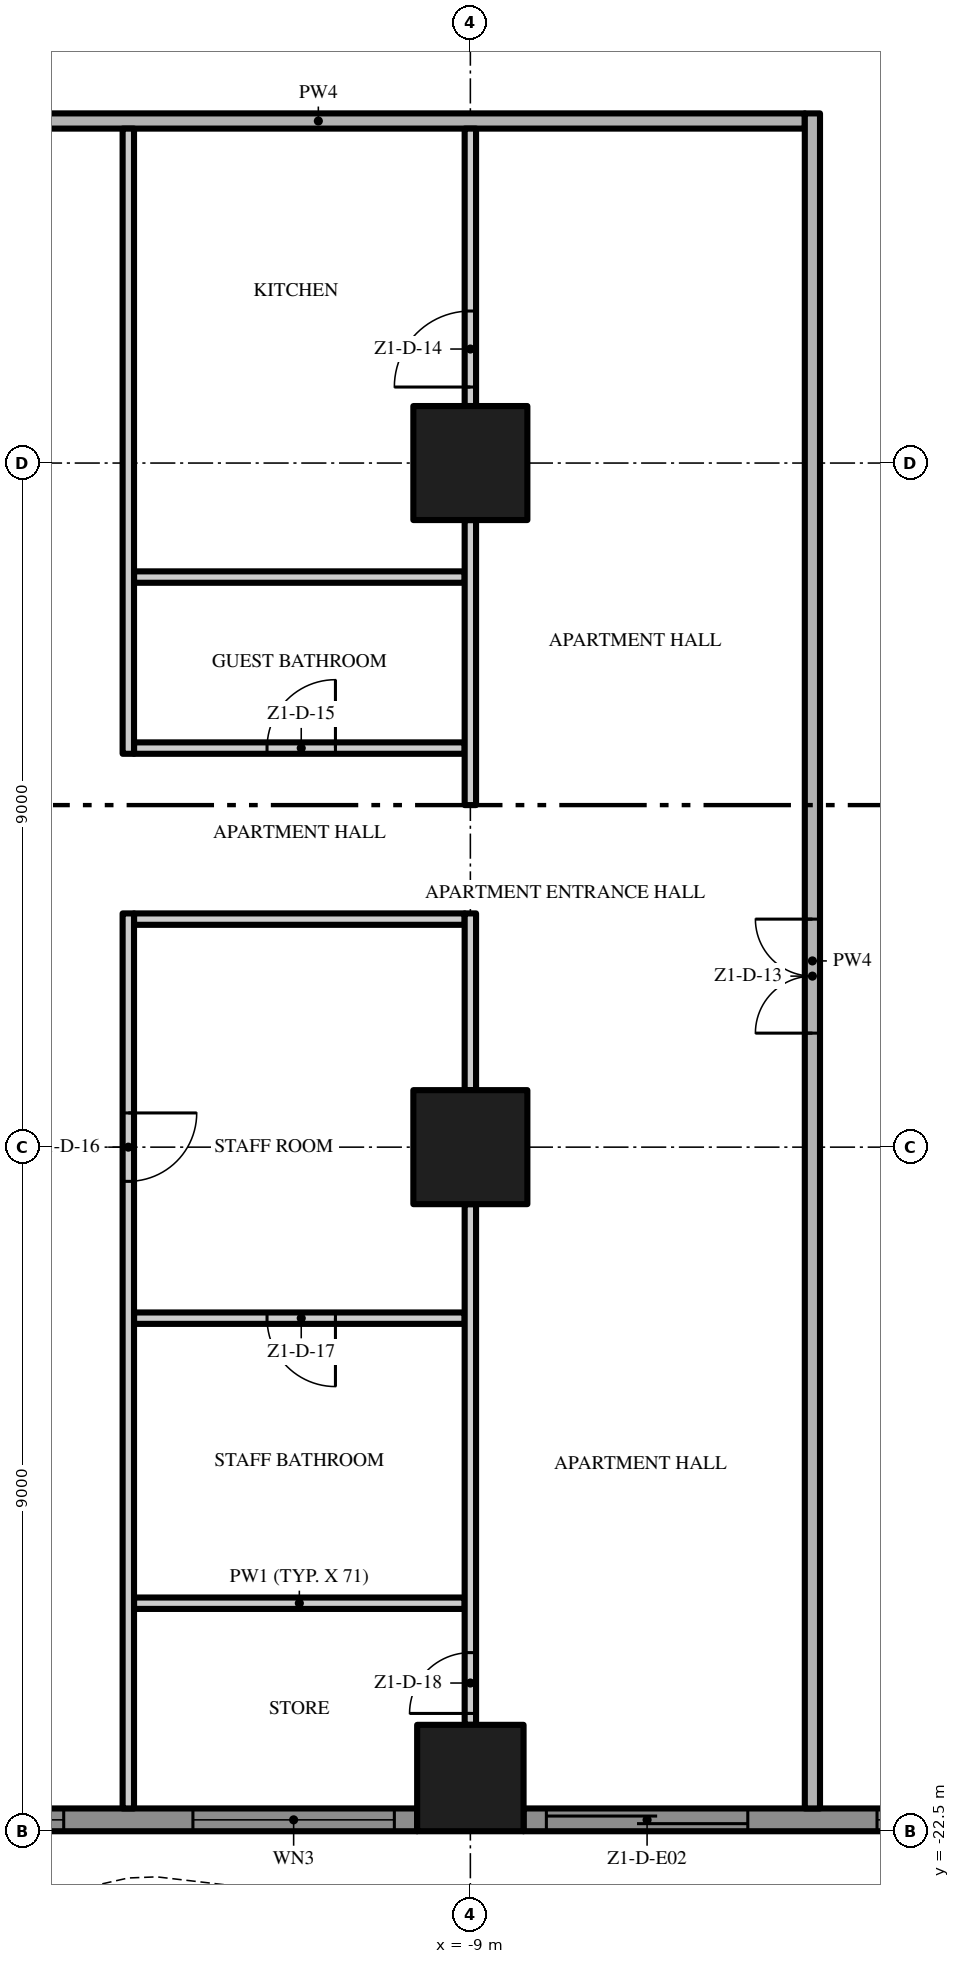
"""IFC4 building model, lengths in metres.
Left out: names, types, materials, properties, quantities, classifications, styles, units other than length and angle.
Written with IfcOpenShell. Run it as: python <this file> out.ifc"""

import sys

from ifc_helpers import new_model, si_unit, direction, frame, frame_2d, origin, origin_2d, place, context, subcontext, project, spatial, polyline, rectangle, outline, extrude, element, fill, save


model = new_model("IFC4")
c1 = context("Model", 3, precision=1e-05, world=origin(), true_north=direction((0.0, 1.0)))
c2 = subcontext(c1, "Body", "Model", "MODEL_VIEW")
j1 = project(units=[si_unit("LENGTHUNIT", "METRE"), si_unit("PLANEANGLEUNIT", "RADIAN")], contexts=[c1])
p1 = place(None, origin())
s1 = spatial("IfcSite", under=j1, at=p1, CompositionType="ELEMENT")
p2 = place(p1, origin())
s2 = spatial("IfcBuilding", under=s1, at=p2, CompositionType="ELEMENT")
p3 = place(p2, frame((0.0, 0.0, 49.2)))
s3 = spatial("IfcBuildingStorey", under=s2, at=p3, CompositionType="ELEMENT", Elevation=49.2)
p4 = place(p3, frame((-9.0, -13.5, 0.0), z_axis=(0.0, 0.0, 1.0), x_axis=(1.0, 0.0, 0.0)))
e1 = element("IfcColumn", 1, at=p4, inside=s3, PredefinedType="COLUMN", context=c2, shape_type="SweptSolid", body=[
    extrude(rectangle(XDim=1.5, YDim=1.5, at=origin_2d()), origin(), (0.0, 0.0, 1.0), 3.5),
])
p5 = place(p3, frame((-9.0, -21.8, 0.0), z_axis=(0.0, 0.0, 1.0), x_axis=(1.0, 0.0, 0.0)))
e2 = element("IfcColumn", 2, at=p5, inside=s3, PredefinedType="COLUMN", context=c2, shape_type="SweptSolid", body=[
    extrude(rectangle(XDim=1.4, YDim=1.4, at=origin_2d()), origin(), (0.0, 0.0, 1.0), 3.5),
])
p6 = place(p3, frame((-9.0, -4.5, 0.0), z_axis=(0.0, 0.0, 1.0), x_axis=(1.0, 0.0, 0.0)))
e3 = element("IfcColumn", 3, at=p6, inside=s3, PredefinedType="COLUMN", context=c2, shape_type="SweptSolid", body=[
    extrude(rectangle(XDim=1.5, YDim=1.5, at=origin_2d()), origin(), (0.0, 0.0, 1.0), 3.5),
])
p7 = place(p3, frame((-9.7, -22.35, 0.0), z_axis=(0.0, 0.0, 1.0), x_axis=(-1.0, 0.0, 0.0)))
e4 = element("IfcWall", 4, at=p7, inside=s3, PredefinedType="SOLIDWALL", context=c2, shape_type="SweptSolid", body=[
    extrude(rectangle(XDim=7.6, YDim=0.3, at=frame_2d((3.8, 0.0))), origin(), (0.0, 0.0, 1.0), 3.5),
])
p8 = place(p7, frame((4.65, 0.0, 0.45)))
e5 = element("IfcOpeningElement", 5, at=p8, cuts=e4, PredefinedType="OPENING", context=c2, shape_type="SweptSolid", body=[
    extrude(rectangle(XDim=2.65, YDim=2.65, at=frame_2d((1.325, 1.325))), frame((0.0, 0.16, 0.0), z_axis=(0.0, -1.0, 0.0), x_axis=(1.0, 0.0, 0.0)), (0.0, 0.0, 1.0), 0.32),
])
p9 = place(p7, frame((0.3, 0.0, 0.45)))
e6 = element("IfcOpeningElement", 6, at=p9, cuts=e4, PredefinedType="OPENING", context=c2, shape_type="SweptSolid", body=[
    extrude(rectangle(XDim=2.65, YDim=2.65, at=frame_2d((1.325, 1.325))), frame((0.0, 0.16, 0.0), z_axis=(0.0, -1.0, 0.0), x_axis=(1.0, 0.0, 0.0)), (0.0, 0.0, 1.0), 0.32),
])
p10 = place(p3, frame((-0.7, -22.35, 0.0), z_axis=(0.0, 0.0, 1.0), x_axis=(-1.0, 0.0, 0.0)))
e7 = element("IfcWall", 7, at=p10, inside=s3, PredefinedType="SOLIDWALL", context=c2, shape_type="SweptSolid", body=[
    extrude(rectangle(XDim=7.6, YDim=0.3, at=frame_2d((3.8, 0.0))), origin(), (0.0, 0.0, 1.0), 3.5),
])
p11 = place(p10, frame((4.65, 0.0, 0.0)))
e8 = element("IfcOpeningElement", 8, at=p11, cuts=e7, PredefinedType="OPENING", context=c2, shape_type="SweptSolid", body=[
    extrude(rectangle(XDim=2.65, YDim=2.4, at=frame_2d((1.325, 1.2))), frame((0.0, 0.16, 0.0), z_axis=(0.0, -1.0, 0.0), x_axis=(1.0, 0.0, 0.0)), (0.0, 0.0, 1.0), 0.32),
])
p12 = place(p10, frame((0.3, 0.0, 0.45)))
e9 = element("IfcOpeningElement", 9, at=p12, cuts=e7, PredefinedType="OPENING", context=c2, shape_type="SweptSolid", body=[
    extrude(rectangle(XDim=2.65, YDim=2.65, at=frame_2d((1.325, 1.325))), frame((0.0, 0.16, 0.0), z_axis=(0.0, -1.0, 0.0), x_axis=(1.0, 0.0, 0.0)), (0.0, 0.0, 1.0), 0.32),
])
p13 = place(p3, origin())
e10 = element("IfcWall", 10, at=p13, inside=s3, PredefinedType="USERDEFINED", context=c2, shape_type="SweptSolid", body=[
    extrude(outline(polyline([(-22.5, -25.149), (-21.0, -25.485), (-20.625, -25.5), (-19.5, -25.369), (-18.0, -24.845), (-16.5, -24.112), (-15.0, -23.451), (-13.5, -23.115), (-13.125, -23.1), (-12.0, -23.231), (-10.5, -23.755), (-9.0, -24.488), (-7.5, -25.149), (-6.0, -25.485), (-5.625, -25.5), (-4.5, -25.369), (-3.0, -24.845), (-1.5, -24.112), (0.0, -23.451), (1.5, -23.115), (1.875, -23.1), (3.0, -23.231), (4.5, -23.755), (6.0, -24.488), (7.5, -25.149), (9.0, -25.485), (9.375, -25.5), (10.5, -25.369), (12.0, -24.845), (13.5, -24.112), (15.0, -23.451), (16.5, -23.115), (16.875, -23.1), (18.0, -23.231), (19.5, -23.755), (21.0, -24.488), (22.5, -25.149), (22.601, -24.92), (21.105, -24.261), (19.596, -23.524), (18.056, -22.986), (16.885, -22.849), (16.467, -22.866), (14.921, -23.213), (13.395, -23.885), (11.904, -24.614), (10.444, -25.124), (9.365, -25.249), (9.033, -25.236), (7.579, -24.91), (6.105, -24.261), (4.596, -23.524), (3.056, -22.986), (1.885, -22.849), (1.467, -22.866), (-0.079, -23.213), (-1.605, -23.885), (-3.096, -24.614), (-4.556, -25.124), (-5.635, -25.249), (-5.967, -25.236), (-7.421, -24.91), (-8.895, -24.261), (-10.404, -23.524), (-11.944, -22.986), (-13.115, -22.849), (-13.533, -22.866), (-15.079, -23.213), (-16.605, -23.885), (-18.096, -24.614), (-19.556, -25.124), (-20.635, -25.249), (-20.967, -25.236), (-22.445, -24.905), (-22.5, -25.149)])), origin(), (0.0, 0.0, 1.0), 0.9),
])
p14 = place(p3, frame((-13.425, -19.5, 0.0), z_axis=(0.0, 0.0, 1.0), x_axis=(1.0, 0.0, 0.0)))
e11 = element("IfcWall", 11, at=p14, inside=s3, PredefinedType="PARTITIONING", context=c2, shape_type="SweptSolid", body=[
    extrude(rectangle(XDim=4.35, YDim=0.15, at=frame_2d((2.175, 0.0))), origin(), (0.0, 0.0, 1.0), 3.5),
])
p15 = place(p3, frame((-9.075, -15.75, 0.0), z_axis=(0.0, 0.0, 1.0), x_axis=(-1.0, 0.0, 0.0)))
e12 = element("IfcWall", 12, at=p15, inside=s3, PredefinedType="PARTITIONING", context=c2, shape_type="SweptSolid", body=[
    extrude(rectangle(XDim=4.35, YDim=0.15, at=frame_2d((2.175, 0.0))), origin(), (0.0, 0.0, 1.0), 3.5),
])
p16 = place(p15, frame((1.7, 0.0, 0.0)))
e13 = element("IfcOpeningElement", 13, at=p16, cuts=e12, PredefinedType="OPENING", context=c2, shape_type="SweptSolid", body=[
    extrude(rectangle(XDim=0.9, YDim=2.1, at=frame_2d((0.45, 1.05))), frame((0.0, 0.085, 0.0), z_axis=(0.0, -1.0, 0.0), x_axis=(1.0, 0.0, 0.0)), (0.0, 0.0, 1.0), 0.17),
])
p17 = place(p3, frame((-13.425, -10.5, 0.0), z_axis=(0.0, 0.0, 1.0), x_axis=(1.0, 0.0, 0.0)))
e14 = element("IfcWall", 14, at=p17, inside=s3, PredefinedType="PARTITIONING", context=c2, shape_type="SweptSolid", body=[
    extrude(rectangle(XDim=4.35, YDim=0.15, at=frame_2d((2.175, 0.0))), origin(), (0.0, 0.0, 1.0), 3.5),
])
p18 = place(p3, frame((-13.425, -8.25, 0.0), z_axis=(0.0, 0.0, 1.0), x_axis=(1.0, 0.0, 0.0)))
e15 = element("IfcWall", 15, at=p18, inside=s3, PredefinedType="PARTITIONING", context=c2, shape_type="SweptSolid", body=[
    extrude(rectangle(XDim=4.35, YDim=0.15, at=frame_2d((2.175, 0.0))), origin(), (0.0, 0.0, 1.0), 3.5),
])
p19 = place(p18, frame((1.75, 0.0, 0.0)))
e16 = element("IfcOpeningElement", 16, at=p19, cuts=e15, PredefinedType="OPENING", context=c2, shape_type="SweptSolid", body=[
    extrude(rectangle(XDim=0.9, YDim=2.1, at=frame_2d((0.45, 1.05))), frame((0.0, 0.085, 0.0), z_axis=(0.0, -1.0, 0.0), x_axis=(1.0, 0.0, 0.0)), (0.0, 0.0, 1.0), 0.17),
])
p20 = place(p3, frame((-13.425, -6.0, 0.0), z_axis=(0.0, 0.0, 1.0), x_axis=(1.0, 0.0, 0.0)))
e17 = element("IfcWall", 17, at=p20, inside=s3, PredefinedType="PARTITIONING", context=c2, shape_type="SweptSolid", body=[
    extrude(rectangle(XDim=4.35, YDim=0.15, at=frame_2d((2.175, 0.0))), origin(), (0.0, 0.0, 1.0), 3.5),
])
p21 = place(p3, frame((-17.4, 0.0, 0.0), z_axis=(0.0, 0.0, 1.0), x_axis=(1.0, 0.0, 0.0)))
e18 = element("IfcWall", 18, at=p21, inside=s3, PredefinedType="PARTITIONING", context=c2, shape_type="SweptSolid", body=[
    extrude(rectangle(XDim=12.8, YDim=0.2, at=frame_2d((6.4, 0.0))), origin(), (0.0, 0.0, 1.0), 3.5),
])
p22 = place(p3, frame((-13.5, -10.425, 0.0), z_axis=(0.0, 0.0, 1.0), x_axis=(0.0, -1.0, 0.0)))
e19 = element("IfcWall", 19, at=p22, inside=s3, PredefinedType="PARTITIONING", context=c2, shape_type="SweptSolid", body=[
    extrude(rectangle(XDim=11.775, YDim=0.15, at=frame_2d((5.888, 0.0))), origin(), (0.0, 0.0, 1.0), 3.5),
])
p23 = place(p22, frame((2.625, 0.0, 0.0)))
e20 = element("IfcOpeningElement", 20, at=p23, cuts=e19, PredefinedType="OPENING", context=c2, shape_type="SweptSolid", body=[
    extrude(rectangle(XDim=0.9, YDim=2.1, at=frame_2d((0.45, 1.05))), frame((0.0, 0.085, 0.0), z_axis=(0.0, -1.0, 0.0), x_axis=(1.0, 0.0, 0.0)), (0.0, 0.0, 1.0), 0.17),
])
p24 = place(p3, frame((-13.5, -8.325, 0.0), z_axis=(0.0, 0.0, 1.0), x_axis=(0.0, 1.0, 0.0)))
e21 = element("IfcWall", 21, at=p24, inside=s3, PredefinedType="PARTITIONING", context=c2, shape_type="SweptSolid", body=[
    extrude(rectangle(XDim=8.225, YDim=0.15, at=frame_2d((4.112, 0.0))), origin(), (0.0, 0.0, 1.0), 3.5),
])
p25 = place(p3, frame((-9.0, -21.1, 0.0), z_axis=(0.0, 0.0, 1.0), x_axis=(0.0, 1.0, 0.0)))
e22 = element("IfcWall", 22, at=p25, inside=s3, PredefinedType="PARTITIONING", context=c2, shape_type="SweptSolid", body=[
    extrude(rectangle(XDim=6.85, YDim=0.15, at=frame_2d((3.425, 0.0))), origin(), (0.0, 0.0, 1.0), 3.5),
])
p26 = place(p25, frame((0.15, 0.0, 0.0)))
e23 = element("IfcOpeningElement", 23, at=p26, cuts=e22, PredefinedType="OPENING", context=c2, shape_type="SweptSolid", body=[
    extrude(rectangle(XDim=0.8, YDim=2.0, at=frame_2d((0.4, 1.0))), frame((0.0, 0.085, 0.0), z_axis=(0.0, -1.0, 0.0), x_axis=(1.0, 0.0, 0.0)), (0.0, 0.0, 1.0), 0.17),
])
p27 = place(p3, frame((-9.0, -12.75, 0.0), z_axis=(0.0, 0.0, 1.0), x_axis=(0.0, 1.0, 0.0)))
e24 = element("IfcWall", 24, at=p27, inside=s3, PredefinedType="PARTITIONING", context=c2, shape_type="SweptSolid", body=[
    extrude(rectangle(XDim=2.325, YDim=0.15, at=frame_2d((1.163, 0.0))), origin(), (0.0, 0.0, 1.0), 3.5),
])
p28 = place(p3, frame((-9.0, -9.0, 0.0), z_axis=(0.0, 0.0, 1.0), x_axis=(0.0, 1.0, 0.0)))
e25 = element("IfcWall", 25, at=p28, inside=s3, PredefinedType="PARTITIONING", context=c2, shape_type="SweptSolid", body=[
    extrude(rectangle(XDim=3.75, YDim=0.15, at=frame_2d((1.875, 0.0))), origin(), (0.0, 0.0, 1.0), 3.5),
])
p29 = place(p3, frame((-9.0, -3.75, 0.0), z_axis=(0.0, 0.0, 1.0), x_axis=(0.0, 1.0, 0.0)))
e26 = element("IfcWall", 26, at=p29, inside=s3, PredefinedType="PARTITIONING", context=c2, shape_type="SweptSolid", body=[
    extrude(rectangle(XDim=3.65, YDim=0.15, at=frame_2d((1.825, 0.0))), origin(), (0.0, 0.0, 1.0), 3.5),
])
p30 = place(p29, frame((0.25, 0.0, 0.0)))
e27 = element("IfcOpeningElement", 27, at=p30, cuts=e26, PredefinedType="OPENING", context=c2, shape_type="SweptSolid", body=[
    extrude(rectangle(XDim=1.0, YDim=2.4, at=frame_2d((0.5, 1.2))), frame((0.0, 0.085, 0.0), z_axis=(0.0, -1.0, 0.0), x_axis=(1.0, 0.0, 0.0)), (0.0, 0.0, 1.0), 0.17),
])
p31 = place(p3, frame((-4.5, -22.2, 0.0), z_axis=(0.0, 0.0, 1.0), x_axis=(0.0, 1.0, 0.0)))
e28 = element("IfcWall", 28, at=p31, inside=s3, PredefinedType="PARTITIONING", context=c2, shape_type="SweptSolid", body=[
    extrude(rectangle(XDim=22.3, YDim=0.2, at=frame_2d((11.15, 0.0))), origin(), (0.0, 0.0, 1.0), 3.5),
])
p32 = place(p31, frame((10.2, 0.0, 0.0)))
e29 = element("IfcOpeningElement", 29, at=p32, cuts=e28, PredefinedType="OPENING", context=c2, shape_type="SweptSolid", body=[
    extrude(rectangle(XDim=1.5, YDim=2.4, at=frame_2d((0.75, 1.2))), frame((0.0, 0.11, 0.0), z_axis=(0.0, -1.0, 0.0), x_axis=(1.0, 0.0, 0.0)), (0.0, 0.0, 1.0), 0.22),
])
p33 = place(p8, origin())
e30 = element("IfcWindow", 30, at=p33, inside=s3, PartitioningType="SINGLE_PANEL", PredefinedType="WINDOW", context=c2, shape_type="SweptSolid", body=[
    extrude(rectangle(XDim=2.65, YDim=2.65, at=frame_2d((1.325, 1.325))), frame((0.0, 0.03, 0.0), z_axis=(0.0, -1.0, 0.0), x_axis=(1.0, 0.0, 0.0)), (0.0, 0.0, 1.0), 0.06),
])
fill(e5, e30)
p34 = place(p9, origin())
e31 = element("IfcWindow", 31, at=p34, inside=s3, PartitioningType="SINGLE_PANEL", PredefinedType="WINDOW", context=c2, shape_type="SweptSolid", body=[
    extrude(rectangle(XDim=2.65, YDim=2.65, at=frame_2d((1.325, 1.325))), frame((0.0, 0.03, 0.0), z_axis=(0.0, -1.0, 0.0), x_axis=(1.0, 0.0, 0.0)), (0.0, 0.0, 1.0), 0.06),
])
fill(e6, e31)
p35 = place(p11, origin())
e32 = element("IfcDoor", 32, at=p35, inside=s3, OperationType="SINGLE_SWING_LEFT", PredefinedType="DOOR", context=c2, shape_type="SweptSolid", body=[
    extrude(rectangle(XDim=2.65, YDim=2.4, at=frame_2d((1.325, 1.2))), frame((0.0, 0.025, 0.0), z_axis=(0.0, -1.0, 0.0), x_axis=(1.0, 0.0, 0.0)), (0.0, 0.0, 1.0), 0.05),
])
fill(e8, e32)
p36 = place(p12, origin())
e33 = element("IfcWindow", 33, at=p36, inside=s3, PartitioningType="SINGLE_PANEL", PredefinedType="WINDOW", context=c2, shape_type="SweptSolid", body=[
    extrude(rectangle(XDim=2.65, YDim=2.65, at=frame_2d((1.325, 1.325))), frame((0.0, 0.03, 0.0), z_axis=(0.0, -1.0, 0.0), x_axis=(1.0, 0.0, 0.0)), (0.0, 0.0, 1.0), 0.06),
])
fill(e9, e33)
p37 = place(p32, origin())
e34 = element("IfcDoor", 34, at=p37, inside=s3, OperationType="DOUBLE_DOOR_SINGLE_SWING", PredefinedType="DOOR", context=c2, shape_type="SweptSolid", body=[
    extrude(rectangle(XDim=1.5, YDim=2.4, at=frame_2d((0.75, 1.2))), frame((0.0, 0.025, 0.0), z_axis=(0.0, -1.0, 0.0), x_axis=(1.0, 0.0, 0.0)), (0.0, 0.0, 1.0), 0.05),
])
fill(e29, e34)
p38 = place(p30, origin())
e35 = element("IfcDoor", 35, at=p38, inside=s3, OperationType="SINGLE_SWING_LEFT", PredefinedType="DOOR", context=c2, shape_type="SweptSolid", body=[
    extrude(rectangle(XDim=1.0, YDim=2.4, at=frame_2d((0.5, 1.2))), frame((0.0, 0.025, 0.0), z_axis=(0.0, -1.0, 0.0), x_axis=(1.0, 0.0, 0.0)), (0.0, 0.0, 1.0), 0.05),
])
fill(e27, e35)
p39 = place(p19, origin())
e36 = element("IfcDoor", 36, at=p39, inside=s3, OperationType="SINGLE_SWING_RIGHT", PredefinedType="DOOR", context=c2, shape_type="SweptSolid", body=[
    extrude(rectangle(XDim=0.9, YDim=2.1, at=frame_2d((0.45, 1.05))), frame((0.0, 0.025, 0.0), z_axis=(0.0, -1.0, 0.0), x_axis=(1.0, 0.0, 0.0)), (0.0, 0.0, 1.0), 0.05),
])
fill(e16, e36)
p40 = place(p23, origin())
e37 = element("IfcDoor", 37, at=p40, inside=s3, OperationType="SINGLE_SWING_LEFT", PredefinedType="DOOR", context=c2, shape_type="SweptSolid", body=[
    extrude(rectangle(XDim=0.9, YDim=2.1, at=frame_2d((0.45, 1.05))), frame((0.0, 0.025, 0.0), z_axis=(0.0, -1.0, 0.0), x_axis=(1.0, 0.0, 0.0)), (0.0, 0.0, 1.0), 0.05),
])
fill(e20, e37)
p41 = place(p16, origin())
e38 = element("IfcDoor", 38, at=p41, inside=s3, OperationType="SINGLE_SWING_LEFT", PredefinedType="DOOR", context=c2, shape_type="SweptSolid", body=[
    extrude(rectangle(XDim=0.9, YDim=2.1, at=frame_2d((0.45, 1.05))), frame((0.0, 0.025, 0.0), z_axis=(0.0, -1.0, 0.0), x_axis=(1.0, 0.0, 0.0)), (0.0, 0.0, 1.0), 0.05),
])
fill(e13, e38)
p42 = place(p26, origin())
e39 = element("IfcDoor", 39, at=p42, inside=s3, OperationType="SINGLE_SWING_LEFT", PredefinedType="DOOR", context=c2, shape_type="SweptSolid", body=[
    extrude(rectangle(XDim=0.8, YDim=2.0, at=frame_2d((0.4, 1.0))), frame((0.0, 0.025, 0.0), z_axis=(0.0, -1.0, 0.0), x_axis=(1.0, 0.0, 0.0)), (0.0, 0.0, 1.0), 0.05),
])
fill(e23, e39)
save(model, sys.argv[1])
